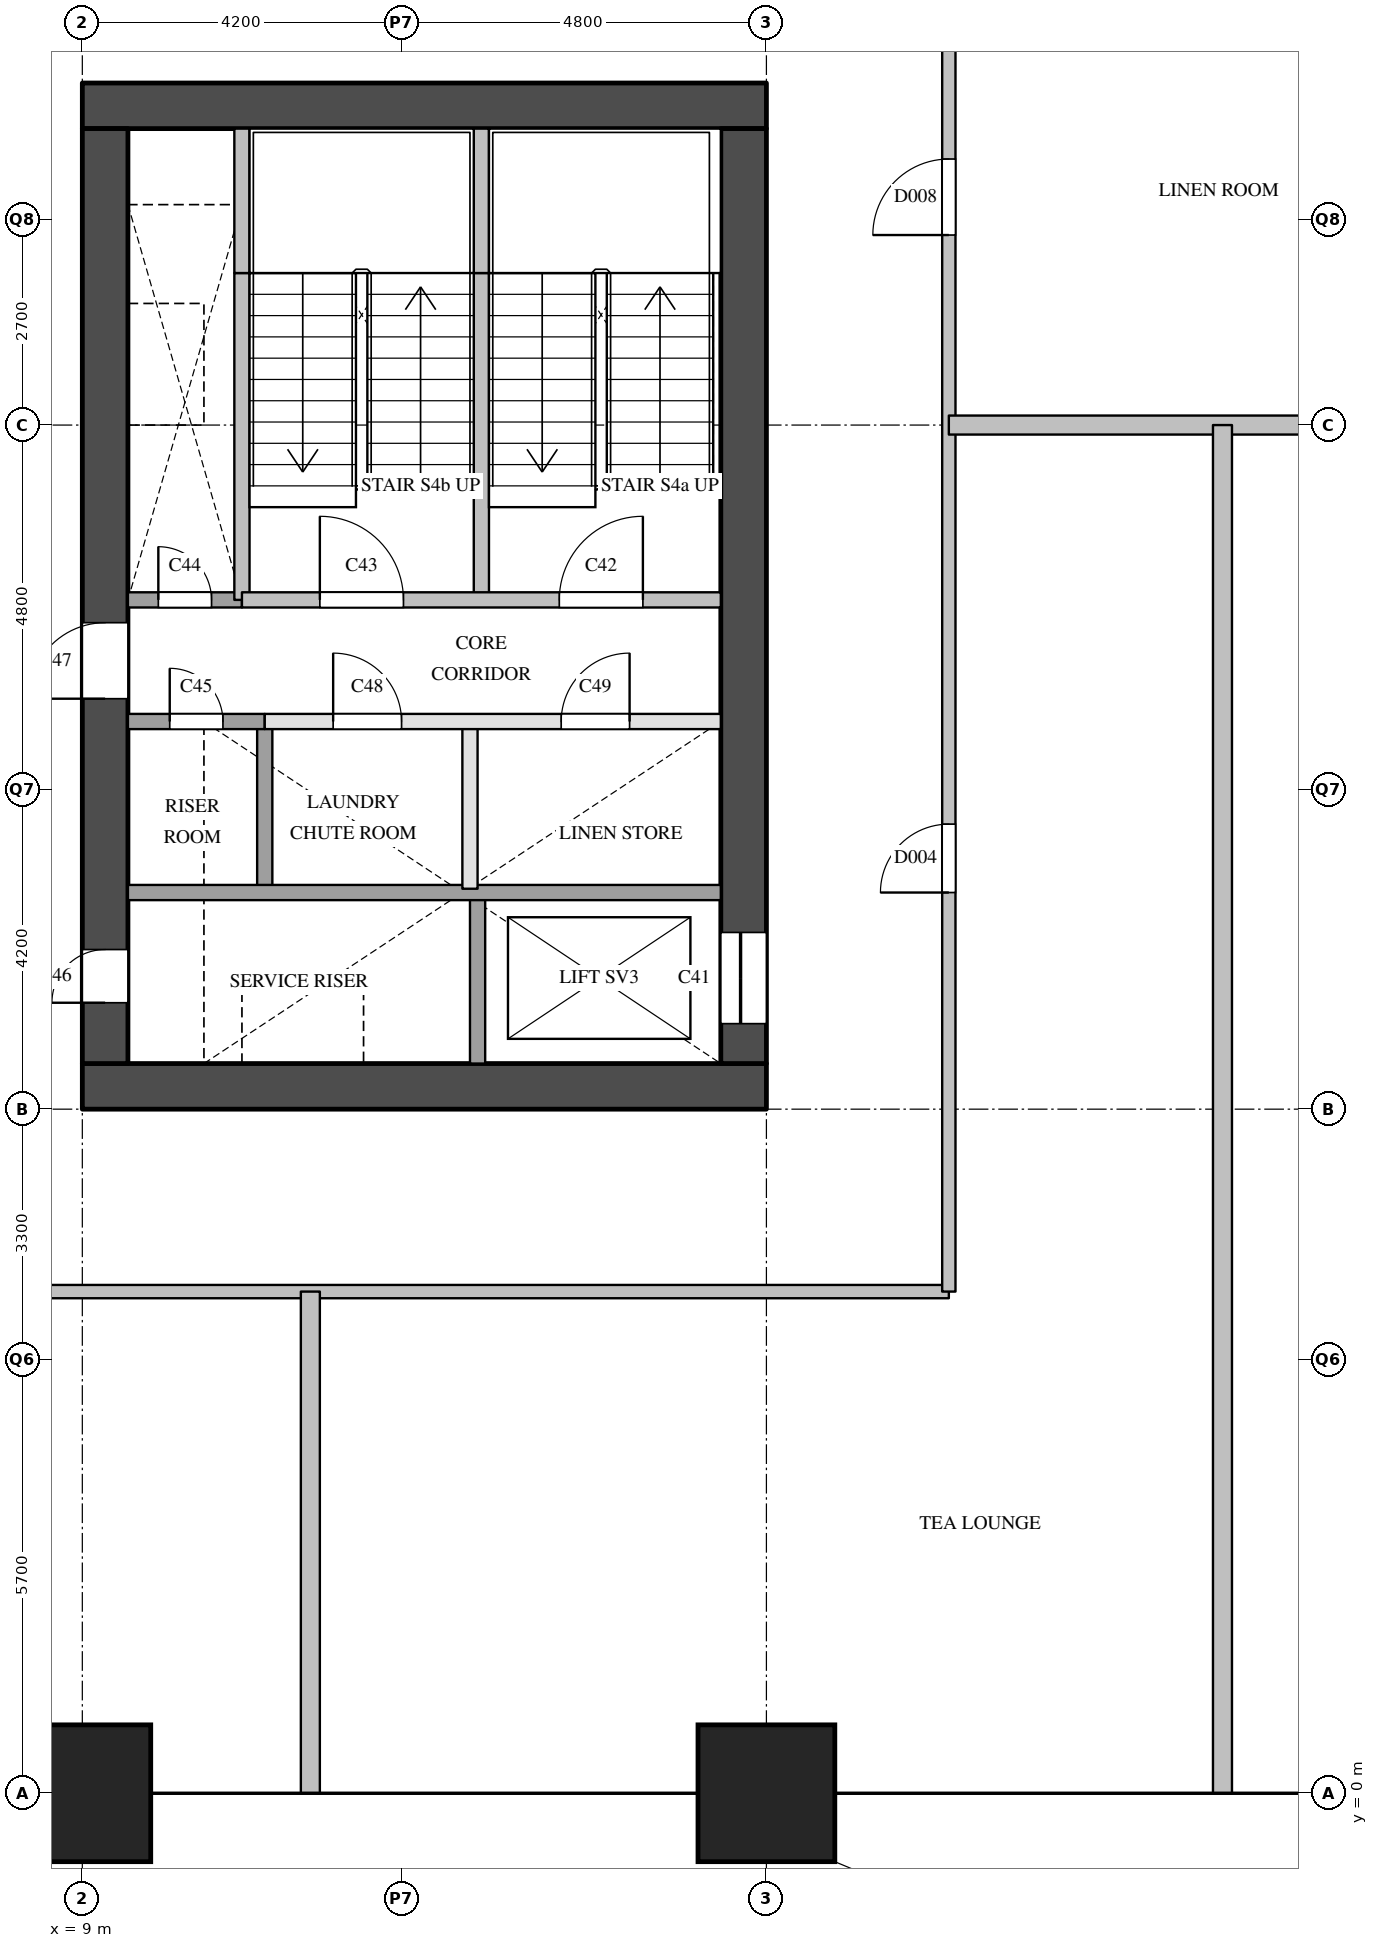
"""IFC4 building model, lengths in metres.
Left out: names, types, materials, properties, quantities, classifications, styles, units other than length and angle.
Written with IfcOpenShell. Run it as: python <this file> out.ifc"""

import sys

from ifc_helpers import new_model, si_unit, direction, frame, frame_2d, origin, origin_2d, place, context, subcontext, project, spatial, rectangle, extrude, element, fill, save


model = new_model("IFC4")
c1 = context("Model", 3, precision=1e-05, world=origin(), true_north=direction((0.0, 1.0)))
c2 = subcontext(c1, "Body", "Model", "MODEL_VIEW")
j1 = project(units=[si_unit("LENGTHUNIT", "METRE"), si_unit("PLANEANGLEUNIT", "RADIAN")], contexts=[c1])
p1 = place(None, origin())
s1 = spatial("IfcSite", under=j1, at=p1, CompositionType="ELEMENT")
p2 = place(p1, origin())
s2 = spatial("IfcBuilding", under=s1, at=p2, CompositionType="ELEMENT")
p3 = place(p2, frame((0.0, 0.0, 65.2)))
s3 = spatial("IfcBuildingStorey", under=s2, at=p3, CompositionType="ELEMENT", Elevation=65.2)
for number, where, z_axis, x_axis in (
    (1, (9.0, 0.0, 0.0), (0.0, 0.0, 1.0), (1.0, 0.0, 0.0)),
    (2, (18.0, 0.0, 0.0), (0.0, 0.0, 1.0), (1.0, 0.0, 0.0)),
):
    element("IfcColumn", number, at=place(p3, frame(where, z_axis=z_axis, x_axis=x_axis)), inside=s3, PredefinedType="COLUMN", context=c2, shape_type="SweptSolid", body=[
        extrude(rectangle(XDim=1.8, YDim=1.8, at=origin_2d()), origin(), (0.0, 0.0, 1.0), 3.8),
    ])
for number, where, z_axis, x_axis in (
    (3, (9.0, 9.3, 0.0), (0.0, 0.0, 1.0), (1.0, 0.0, 0.0)),
    (4, (9.0, 22.2, 0.0), (0.0, 0.0, 1.0), (1.0, 0.0, 0.0)),
):
    element("IfcWall", number, at=place(p3, frame(where, z_axis=z_axis, x_axis=x_axis)), inside=s3, PredefinedType="SHEAR", context=c2, shape_type="SweptSolid", body=[
        extrude(rectangle(XDim=9.0, YDim=0.6, at=frame_2d((4.5, 0.0))), origin(), (0.0, 0.0, 1.0), 3.5),
    ])
p4 = place(p3, frame((9.3, 9.6, 0.0), z_axis=(0.0, 0.0, 1.0), x_axis=(0.0, 1.0, 0.0)))
e5 = element("IfcWall", 5, at=p4, inside=s3, PredefinedType="SHEAR", context=c2, shape_type="SweptSolid", body=[
    extrude(rectangle(XDim=12.3, YDim=0.6, at=frame_2d((6.15, 0.0))), origin(), (0.0, 0.0, 1.0), 3.5),
])
p5 = place(p4, frame((0.8, 0.0, 0.0)))
e6 = element("IfcOpeningElement", 6, at=p5, cuts=e5, PredefinedType="OPENING", context=c2, shape_type="SweptSolid", body=[
    extrude(rectangle(XDim=0.7, YDim=2.1, at=frame_2d((0.35, 1.05))), frame((0.0, 0.31, 0.0), z_axis=(0.0, -1.0, 0.0), x_axis=(1.0, 0.0, 0.0)), (0.0, 0.0, 1.0), 0.62),
])
p6 = place(p4, frame((4.8, 0.0, 0.0)))
e7 = element("IfcOpeningElement", 7, at=p6, cuts=e5, PredefinedType="OPENING", context=c2, shape_type="SweptSolid", body=[
    extrude(rectangle(XDim=1.0, YDim=2.1, at=frame_2d((0.5, 1.05))), frame((0.0, 0.31, 0.0), z_axis=(0.0, -1.0, 0.0), x_axis=(1.0, 0.0, 0.0)), (0.0, 0.0, 1.0), 0.62),
])
p7 = place(p3, frame((17.7, 9.6, 0.0), z_axis=(0.0, 0.0, 1.0), x_axis=(0.0, 1.0, 0.0)))
e8 = element("IfcWall", 8, at=p7, inside=s3, PredefinedType="SHEAR", context=c2, shape_type="SweptSolid", body=[
    extrude(rectangle(XDim=12.3, YDim=0.6, at=frame_2d((6.15, 0.0))), origin(), (0.0, 0.0, 1.0), 3.5),
])
p8 = place(p7, frame((0.525, 0.0, 0.0)))
e9 = element("IfcOpeningElement", 9, at=p8, cuts=e8, PredefinedType="OPENING", context=c2, shape_type="SweptSolid", body=[
    extrude(rectangle(XDim=1.2, YDim=2.1, at=frame_2d((0.6, 1.05))), frame((0.0, 0.31, 0.0), z_axis=(0.0, -1.0, 0.0), x_axis=(1.0, 0.0, 0.0)), (0.0, 0.0, 1.0), 0.62),
])
p9 = place(p3, frame((11.1, 15.7, 0.0), z_axis=(0.0, 0.0, 1.0), x_axis=(0.0, 1.0, 0.0)))
e10 = element("IfcWall", 10, at=p9, inside=s3, PredefinedType="SOLIDWALL", context=c2, shape_type="SweptSolid", body=[
    extrude(rectangle(XDim=4.3, YDim=0.2, at=frame_2d((2.15, 0.0))), origin(), (0.0, 0.0, 1.0), 3.5),
])
p10 = place(p3, frame((11.1, 20.0, 0.0), z_axis=(0.0, 0.0, 1.0), x_axis=(0.0, 1.0, 0.0)))
e11 = element("IfcWall", 11, at=p10, inside=s3, PredefinedType="SOLIDWALL", context=c2, shape_type="SweptSolid", body=[
    extrude(rectangle(XDim=1.9, YDim=0.2, at=frame_2d((0.95, 0.0))), origin(), (0.0, 0.0, 1.0), 3.5),
])
p11 = place(p3, frame((11.4, 11.9, 0.0), z_axis=(0.0, 0.0, 1.0), x_axis=(0.0, 1.0, 0.0)))
e12 = element("IfcWall", 12, at=p11, inside=s3, PredefinedType="SOLIDWALL", context=c2, shape_type="SweptSolid", body=[
    extrude(rectangle(XDim=2.2, YDim=0.2, at=frame_2d((1.1, 0.0))), origin(), (0.0, 0.0, 1.0), 3.5),
])
p12 = place(p3, frame((14.1, 11.9, 0.0), z_axis=(0.0, 0.0, 1.0), x_axis=(0.0, 1.0, 0.0)))
e13 = element("IfcWall", 13, at=p12, inside=s3, PredefinedType="PARTITIONING", context=c2, shape_type="SweptSolid", body=[
    extrude(rectangle(XDim=2.2, YDim=0.2, at=frame_2d((1.1, 0.0))), origin(), (0.0, 0.0, 1.0), 3.5),
])
p13 = place(p3, frame((14.2, 9.6, 0.0), z_axis=(0.0, 0.0, 1.0), x_axis=(0.0, 1.0, 0.0)))
e14 = element("IfcWall", 14, at=p13, inside=s3, PredefinedType="SOLIDWALL", context=c2, shape_type="SweptSolid", body=[
    extrude(rectangle(XDim=2.3, YDim=0.2, at=frame_2d((1.15, 0.0))), origin(), (0.0, 0.0, 1.0), 3.5),
])
p14 = place(p3, frame((14.25, 15.7, 0.0), z_axis=(0.0, 0.0, 1.0), x_axis=(0.0, 1.0, 0.0)))
e15 = element("IfcWall", 15, at=p14, inside=s3, PredefinedType="SOLIDWALL", context=c2, shape_type="SweptSolid", body=[
    extrude(rectangle(XDim=4.3, YDim=0.2, at=frame_2d((2.15, 0.0))), origin(), (0.0, 0.0, 1.0), 3.5),
])
p15 = place(p3, frame((14.25, 20.0, 0.0), z_axis=(0.0, 0.0, 1.0), x_axis=(0.0, 1.0, 0.0)))
e16 = element("IfcWall", 16, at=p15, inside=s3, PredefinedType="SOLIDWALL", context=c2, shape_type="SweptSolid", body=[
    extrude(rectangle(XDim=1.9, YDim=0.2, at=frame_2d((0.95, 0.0))), origin(), (0.0, 0.0, 1.0), 3.5),
])
p16 = place(p3, frame((9.6, 11.85, 0.0), z_axis=(0.0, 0.0, 1.0), x_axis=(1.0, 0.0, 0.0)))
e17 = element("IfcWall", 17, at=p16, inside=s3, PredefinedType="SOLIDWALL", context=c2, shape_type="SweptSolid", body=[
    extrude(rectangle(XDim=7.8, YDim=0.2, at=frame_2d((3.9, 0.0))), origin(), (0.0, 0.0, 1.0), 3.5),
])
p17 = place(p3, frame((11.4, 14.1, 0.0), z_axis=(0.0, 0.0, 1.0), x_axis=(1.0, 0.0, 0.0)))
e18 = element("IfcWall", 18, at=p17, inside=s3, PredefinedType="PARTITIONING", context=c2, shape_type="SweptSolid", body=[
    extrude(rectangle(XDim=6.0, YDim=0.2, at=frame_2d((3.0, 0.0))), origin(), (0.0, 0.0, 1.0), 3.5),
])
p18 = place(p17, frame((0.9, 0.0, 0.0)))
e19 = element("IfcOpeningElement", 19, at=p18, cuts=e18, PredefinedType="OPENING", context=c2, shape_type="SweptSolid", body=[
    extrude(rectangle(XDim=0.9, YDim=2.1, at=frame_2d((0.45, 1.05))), frame((0.0, 0.11, 0.0), z_axis=(0.0, -1.0, 0.0), x_axis=(1.0, 0.0, 0.0)), (0.0, 0.0, 1.0), 0.22),
])
p19 = place(p17, frame((3.9, 0.0, 0.0)))
e20 = element("IfcOpeningElement", 20, at=p19, cuts=e18, PredefinedType="OPENING", context=c2, shape_type="SweptSolid", body=[
    extrude(rectangle(XDim=0.9, YDim=2.1, at=frame_2d((0.45, 1.05))), frame((0.0, 0.11, 0.0), z_axis=(0.0, -1.0, 0.0), x_axis=(1.0, 0.0, 0.0)), (0.0, 0.0, 1.0), 0.22),
])
p20 = place(p3, frame((9.6, 14.1, 0.0), z_axis=(0.0, 0.0, 1.0), x_axis=(1.0, 0.0, 0.0)))
e21 = element("IfcWall", 21, at=p20, inside=s3, PredefinedType="SOLIDWALL", context=c2, shape_type="SweptSolid", body=[
    extrude(rectangle(XDim=1.8, YDim=0.2, at=frame_2d((0.9, 0.0))), origin(), (0.0, 0.0, 1.0), 3.5),
])
p21 = place(p20, frame((0.55, 0.0, 0.0)))
e22 = element("IfcOpeningElement", 22, at=p21, cuts=e21, PredefinedType="OPENING", context=c2, shape_type="SweptSolid", body=[
    extrude(rectangle(XDim=0.7, YDim=2.1, at=frame_2d((0.35, 1.05))), frame((0.0, 0.11, 0.0), z_axis=(0.0, -1.0, 0.0), x_axis=(1.0, 0.0, 0.0)), (0.0, 0.0, 1.0), 0.22),
])
p22 = place(p3, frame((9.6, 15.7, 0.0), z_axis=(0.0, 0.0, 1.0), x_axis=(1.0, 0.0, 0.0)))
e23 = element("IfcWall", 23, at=p22, inside=s3, PredefinedType="SOLIDWALL", context=c2, shape_type="SweptSolid", body=[
    extrude(rectangle(XDim=1.5, YDim=0.2, at=frame_2d((0.75, 0.0))), origin(), (0.0, 0.0, 1.0), 3.5),
])
p23 = place(p22, frame((0.4, 0.0, 0.0)))
e24 = element("IfcOpeningElement", 24, at=p23, cuts=e23, PredefinedType="OPENING", context=c2, shape_type="SweptSolid", body=[
    extrude(rectangle(XDim=0.7, YDim=2.1, at=frame_2d((0.35, 1.05))), frame((0.0, 0.11, 0.0), z_axis=(0.0, -1.0, 0.0), x_axis=(1.0, 0.0, 0.0)), (0.0, 0.0, 1.0), 0.22),
])
p24 = place(p3, frame((11.1, 15.7, 0.0), z_axis=(0.0, 0.0, 1.0), x_axis=(1.0, 0.0, 0.0)))
e25 = element("IfcWall", 25, at=p24, inside=s3, PredefinedType="SOLIDWALL", context=c2, shape_type="SweptSolid", body=[
    extrude(rectangle(XDim=6.3, YDim=0.2, at=frame_2d((3.15, 0.0))), origin(), (0.0, 0.0, 1.0), 3.5),
])
p25 = place(p24, frame((4.175, 0.0, 0.0)))
e26 = element("IfcOpeningElement", 26, at=p25, cuts=e25, PredefinedType="OPENING", context=c2, shape_type="SweptSolid", body=[
    extrude(rectangle(XDim=1.1, YDim=2.1, at=frame_2d((0.55, 1.05))), frame((0.0, 0.11, 0.0), z_axis=(0.0, -1.0, 0.0), x_axis=(1.0, 0.0, 0.0)), (0.0, 0.0, 1.0), 0.22),
])
p26 = place(p24, frame((1.025, 0.0, 0.0)))
e27 = element("IfcOpeningElement", 27, at=p26, cuts=e25, PredefinedType="OPENING", context=c2, shape_type="SweptSolid", body=[
    extrude(rectangle(XDim=1.1, YDim=2.1, at=frame_2d((0.55, 1.05))), frame((0.0, 0.11, 0.0), z_axis=(0.0, -1.0, 0.0), x_axis=(1.0, 0.0, 0.0)), (0.0, 0.0, 1.0), 0.22),
])
p27 = place(p3, frame((6.6, 6.6, 0.0), z_axis=(0.0, 0.0, 1.0), x_axis=(1.0, 0.0, 0.0)))
e28 = element("IfcWall", 28, at=p27, inside=s3, PredefinedType="PARTITIONING", context=c2, shape_type="SweptSolid", body=[
    extrude(rectangle(XDim=13.8, YDim=0.175, at=frame_2d((6.9, 0.0))), origin(), (0.0, 0.0, 1.0), 3.5),
])
p28 = place(p3, frame((20.4, 6.6, 0.0), z_axis=(0.0, 0.0, 1.0), x_axis=(0.0, 1.0, 0.0)))
e29 = element("IfcWall", 29, at=p28, inside=s3, PredefinedType="PARTITIONING", context=c2, shape_type="SweptSolid", body=[
    extrude(rectangle(XDim=18.3, YDim=0.175, at=frame_2d((9.15, 0.0))), origin(), (0.0, 0.0, 1.0), 3.5),
])
p29 = place(p28, frame((5.25, 0.0, 0.0)))
e30 = element("IfcOpeningElement", 30, at=p29, cuts=e29, PredefinedType="OPENING", context=c2, shape_type="SweptSolid", body=[
    extrude(rectangle(XDim=0.9, YDim=2.1, at=frame_2d((0.45, 1.05))), frame((0.0, 0.097, 0.0), z_axis=(0.0, -1.0, 0.0), x_axis=(1.0, 0.0, 0.0)), (0.0, 0.0, 1.0), 0.195),
])
p30 = place(p28, frame((13.9, 0.0, 0.0)))
e31 = element("IfcOpeningElement", 31, at=p30, cuts=e29, PredefinedType="OPENING", context=c2, shape_type="SweptSolid", body=[
    extrude(rectangle(XDim=1.0, YDim=2.1, at=frame_2d((0.5, 1.05))), frame((0.0, 0.097, 0.0), z_axis=(0.0, -1.0, 0.0), x_axis=(1.0, 0.0, 0.0)), (0.0, 0.0, 1.0), 0.195),
])
p31 = place(p3, frame((20.4, 18.0, 0.0), z_axis=(0.0, 0.0, 1.0), x_axis=(1.0, 0.0, 0.0)))
e32 = element("IfcWall", 32, at=p31, inside=s3, PredefinedType="PARTITIONING", context=c2, shape_type="SweptSolid", body=[
    extrude(rectangle(XDim=13.2, YDim=0.25, at=frame_2d((6.6, 0.0))), origin(), (0.0, 0.0, 1.0), 3.5),
])
p32 = place(p3, frame((12.0, 0.0, 0.0), z_axis=(0.0, 0.0, 1.0), x_axis=(0.0, 1.0, 0.0)))
e33 = element("IfcWall", 33, at=p32, inside=s3, PredefinedType="PARTITIONING", context=c2, shape_type="SweptSolid", body=[
    extrude(rectangle(XDim=6.6, YDim=0.25, at=frame_2d((3.3, 0.0))), origin(), (0.0, 0.0, 1.0), 2.5),
])
p33 = place(p3, frame((24.0, 0.0, 0.0), z_axis=(0.0, 0.0, 1.0), x_axis=(0.0, 1.0, 0.0)))
e34 = element("IfcWall", 34, at=p33, inside=s3, PredefinedType="PARTITIONING", context=c2, shape_type="SweptSolid", body=[
    extrude(rectangle(XDim=18.0, YDim=0.25, at=frame_2d((9.0, 0.0))), origin(), (0.0, 0.0, 1.0), 2.5),
])
p34 = place(p8, origin())
e35 = element("IfcDoor", 35, at=p34, inside=s3, OperationType="SLIDING_TO_LEFT", PredefinedType="DOOR", context=c2, shape_type="SweptSolid", body=[
    extrude(rectangle(XDim=1.2, YDim=2.1, at=frame_2d((0.6, 1.05))), frame((0.0, 0.025, 0.0), z_axis=(0.0, -1.0, 0.0), x_axis=(1.0, 0.0, 0.0)), (0.0, 0.0, 1.0), 0.05),
])
fill(e9, e35)
p35 = place(p25, origin())
e36 = element("IfcDoor", 36, at=p35, inside=s3, OperationType="SINGLE_SWING_RIGHT", PredefinedType="DOOR", context=c2, shape_type="SweptSolid", body=[
    extrude(rectangle(XDim=1.1, YDim=2.1, at=frame_2d((0.55, 1.05))), frame((0.0, 0.025, 0.0), z_axis=(0.0, -1.0, 0.0), x_axis=(1.0, 0.0, 0.0)), (0.0, 0.0, 1.0), 0.05),
])
fill(e26, e36)
p36 = place(p26, origin())
e37 = element("IfcDoor", 37, at=p36, inside=s3, OperationType="SINGLE_SWING_LEFT", PredefinedType="DOOR", context=c2, shape_type="SweptSolid", body=[
    extrude(rectangle(XDim=1.1, YDim=2.1, at=frame_2d((0.55, 1.05))), frame((0.0, 0.025, 0.0), z_axis=(0.0, -1.0, 0.0), x_axis=(1.0, 0.0, 0.0)), (0.0, 0.0, 1.0), 0.05),
])
fill(e27, e37)
p37 = place(p23, origin())
e38 = element("IfcDoor", 38, at=p37, inside=s3, OperationType="SINGLE_SWING_LEFT", PredefinedType="DOOR", context=c2, shape_type="SweptSolid", body=[
    extrude(rectangle(XDim=0.7, YDim=2.1, at=frame_2d((0.35, 1.05))), frame((0.0, 0.025, 0.0), z_axis=(0.0, -1.0, 0.0), x_axis=(1.0, 0.0, 0.0)), (0.0, 0.0, 1.0), 0.05),
])
fill(e24, e38)
p38 = place(p21, origin())
e39 = element("IfcDoor", 39, at=p38, inside=s3, OperationType="SINGLE_SWING_LEFT", PredefinedType="DOOR", context=c2, shape_type="SweptSolid", body=[
    extrude(rectangle(XDim=0.7, YDim=2.1, at=frame_2d((0.35, 1.05))), frame((0.0, 0.025, 0.0), z_axis=(0.0, -1.0, 0.0), x_axis=(1.0, 0.0, 0.0)), (0.0, 0.0, 1.0), 0.05),
])
fill(e22, e39)
p39 = place(p5, origin())
e40 = element("IfcDoor", 40, at=p39, inside=s3, OperationType="SINGLE_SWING_LEFT", PredefinedType="DOOR", context=c2, shape_type="SweptSolid", body=[
    extrude(rectangle(XDim=0.7, YDim=2.1, at=frame_2d((0.35, 1.05))), frame((0.0, 0.025, 0.0), z_axis=(0.0, -1.0, 0.0), x_axis=(1.0, 0.0, 0.0)), (0.0, 0.0, 1.0), 0.05),
])
fill(e6, e40)
p40 = place(p6, origin())
e41 = element("IfcDoor", 41, at=p40, inside=s3, OperationType="SINGLE_SWING_LEFT", PredefinedType="DOOR", context=c2, shape_type="SweptSolid", body=[
    extrude(rectangle(XDim=1.0, YDim=2.1, at=frame_2d((0.5, 1.05))), frame((0.0, 0.025, 0.0), z_axis=(0.0, -1.0, 0.0), x_axis=(1.0, 0.0, 0.0)), (0.0, 0.0, 1.0), 0.05),
])
fill(e7, e41)
p41 = place(p18, origin())
e42 = element("IfcDoor", 42, at=p41, inside=s3, OperationType="SINGLE_SWING_LEFT", PredefinedType="DOOR", context=c2, shape_type="SweptSolid", body=[
    extrude(rectangle(XDim=0.9, YDim=2.1, at=frame_2d((0.45, 1.05))), frame((0.0, 0.025, 0.0), z_axis=(0.0, -1.0, 0.0), x_axis=(1.0, 0.0, 0.0)), (0.0, 0.0, 1.0), 0.05),
])
fill(e19, e42)
p42 = place(p19, origin())
e43 = element("IfcDoor", 43, at=p42, inside=s3, OperationType="SINGLE_SWING_RIGHT", PredefinedType="DOOR", context=c2, shape_type="SweptSolid", body=[
    extrude(rectangle(XDim=0.9, YDim=2.1, at=frame_2d((0.45, 1.05))), frame((0.0, 0.025, 0.0), z_axis=(0.0, -1.0, 0.0), x_axis=(1.0, 0.0, 0.0)), (0.0, 0.0, 1.0), 0.05),
])
fill(e20, e43)
p43 = place(p29, origin())
e44 = element("IfcDoor", 44, at=p43, inside=s3, OperationType="SINGLE_SWING_LEFT", PredefinedType="DOOR", context=c2, shape_type="SweptSolid", body=[
    extrude(rectangle(XDim=0.9, YDim=2.1, at=frame_2d((0.45, 1.05))), frame((0.0, 0.025, 0.0), z_axis=(0.0, -1.0, 0.0), x_axis=(1.0, 0.0, 0.0)), (0.0, 0.0, 1.0), 0.05),
])
fill(e30, e44)
p44 = place(p30, origin())
e45 = element("IfcDoor", 45, at=p44, inside=s3, OperationType="SINGLE_SWING_LEFT", PredefinedType="DOOR", context=c2, shape_type="SweptSolid", body=[
    extrude(rectangle(XDim=1.0, YDim=2.1, at=frame_2d((0.5, 1.05))), frame((0.0, 0.025, 0.0), z_axis=(0.0, -1.0, 0.0), x_axis=(1.0, 0.0, 0.0)), (0.0, 0.0, 1.0), 0.05),
])
fill(e31, e45)
save(model, sys.argv[1])
